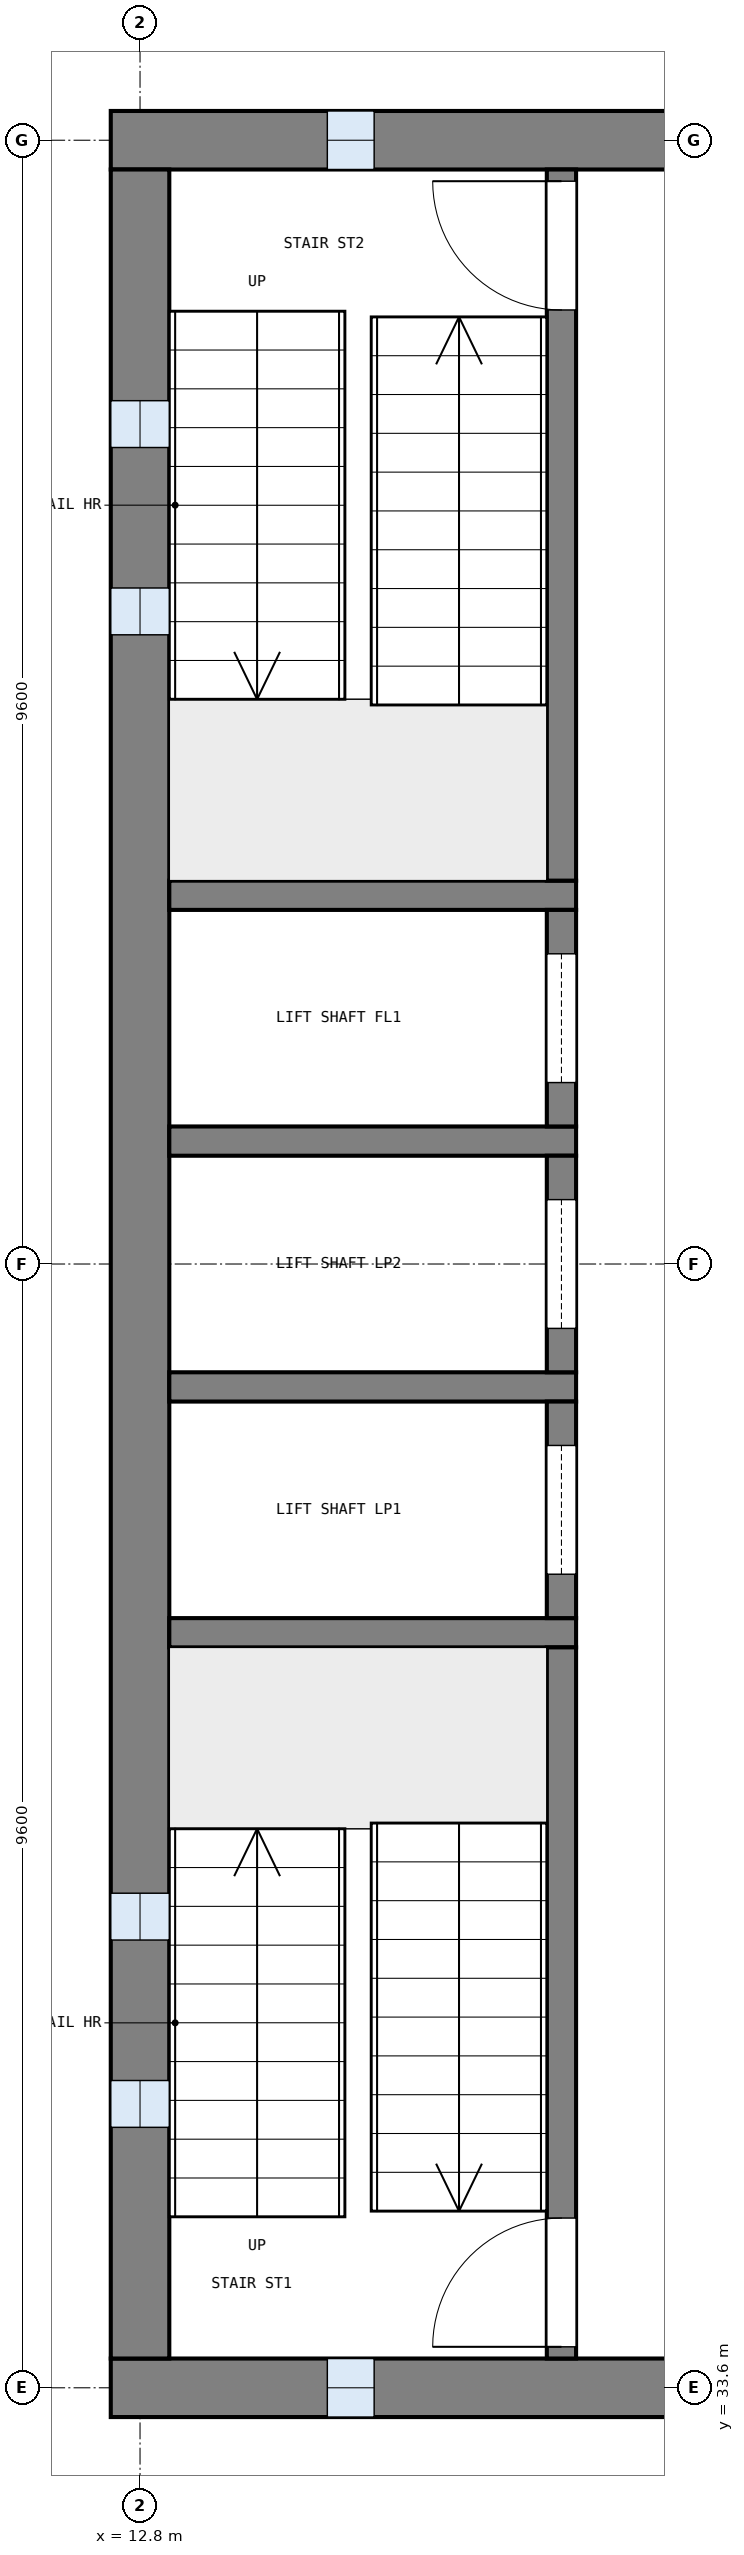
"""IFC4 building model, lengths in metres.
Left out: names, types, materials, properties, quantities, classifications, styles, units other than length and angle.
Written with IfcOpenShell. Run it as: python <this file> out.ifc"""

import sys

from ifc_helpers import new_model, si_unit, direction, frame, frame_2d, origin, place, context, subcontext, project, spatial, rectangle, extrude, element, fill, save


model = new_model("IFC4")
c1 = context("Model", 3, precision=1e-05, world=origin(), true_north=direction((0.0, 1.0)))
c2 = subcontext(c1, "Body", "Model", "MODEL_VIEW")
j1 = project(units=[si_unit("LENGTHUNIT", "METRE"), si_unit("PLANEANGLEUNIT", "RADIAN")], contexts=[c1])
p1 = place(None, origin())
s1 = spatial("IfcSite", under=j1, at=p1, CompositionType="ELEMENT")
p2 = place(p1, origin())
s2 = spatial("IfcBuilding", under=s1, at=p2, CompositionType="ELEMENT")
p3 = place(p2, frame((0.0, 0.0, 21.0)))
s3 = spatial("IfcBuildingStorey", under=s2, at=p3, CompositionType="ELEMENT", Elevation=21.0)
p4 = place(p3, frame((12.55, 52.8, 0.0), z_axis=(0.0, 0.0, 1.0), x_axis=(1.0, 0.0, 0.0)))
e1 = element("IfcWall", 1, at=p4, inside=s3, PredefinedType="SHEAR", context=c2, shape_type="SweptSolid", body=[
    extrude(rectangle(XDim=13.3, YDim=0.5, at=frame_2d((6.65, 0.0))), origin(), (0.0, 0.0, 1.0), 3.9),
])
p5 = place(p4, frame((1.85, 0.0, 1.0)))
e2 = element("IfcOpeningElement", 2, at=p5, cuts=e1, PredefinedType="OPENING", context=c2, shape_type="SweptSolid", body=[
    extrude(rectangle(XDim=0.4, YDim=2.0, at=frame_2d((0.2, 1.0))), frame((0.0, 0.26, 0.0), z_axis=(0.0, -1.0, 0.0), x_axis=(1.0, 0.0, 0.0)), (0.0, 0.0, 1.0), 0.52),
])
p6 = place(p3, frame((12.55, 33.6, 0.0), z_axis=(0.0, 0.0, 1.0), x_axis=(1.0, 0.0, 0.0)))
e3 = element("IfcWall", 3, at=p6, inside=s3, PredefinedType="SHEAR", context=c2, shape_type="SweptSolid", body=[
    extrude(rectangle(XDim=13.3, YDim=0.5, at=frame_2d((6.65, 0.0))), origin(), (0.0, 0.0, 1.0), 3.9),
])
p7 = place(p6, frame((1.85, 0.0, 1.0)))
e4 = element("IfcOpeningElement", 4, at=p7, cuts=e3, PredefinedType="OPENING", context=c2, shape_type="SweptSolid", body=[
    extrude(rectangle(XDim=0.4, YDim=2.0, at=frame_2d((0.2, 1.0))), frame((0.0, 0.26, 0.0), z_axis=(0.0, -1.0, 0.0), x_axis=(1.0, 0.0, 0.0)), (0.0, 0.0, 1.0), 0.52),
])
p8 = place(p3, frame((12.8, 33.85, 0.0), z_axis=(0.0, 0.0, 1.0), x_axis=(0.0, 1.0, 0.0)))
e5 = element("IfcWall", 5, at=p8, inside=s3, PredefinedType="SHEAR", context=c2, shape_type="SweptSolid", body=[
    extrude(rectangle(XDim=18.7, YDim=0.5, at=frame_2d((9.35, 0.0))), origin(), (0.0, 0.0, 1.0), 3.9),
])
p9 = place(p8, frame((1.975, 0.0, 1.0)))
e6 = element("IfcOpeningElement", 6, at=p9, cuts=e5, PredefinedType="OPENING", context=c2, shape_type="SweptSolid", body=[
    extrude(rectangle(XDim=0.4, YDim=2.0, at=frame_2d((0.2, 1.0))), frame((0.0, 0.26, 0.0), z_axis=(0.0, -1.0, 0.0), x_axis=(1.0, 0.0, 0.0)), (0.0, 0.0, 1.0), 0.52),
])
p10 = place(p8, frame((3.575, 0.0, 1.0)))
e7 = element("IfcOpeningElement", 7, at=p10, cuts=e5, PredefinedType="OPENING", context=c2, shape_type="SweptSolid", body=[
    extrude(rectangle(XDim=0.4, YDim=2.0, at=frame_2d((0.2, 1.0))), frame((0.0, 0.26, 0.0), z_axis=(0.0, -1.0, 0.0), x_axis=(1.0, 0.0, 0.0)), (0.0, 0.0, 1.0), 0.52),
])
p11 = place(p8, frame((14.725, 0.0, 1.0)))
e8 = element("IfcOpeningElement", 8, at=p11, cuts=e5, PredefinedType="OPENING", context=c2, shape_type="SweptSolid", body=[
    extrude(rectangle(XDim=0.4, YDim=2.0, at=frame_2d((0.2, 1.0))), frame((0.0, 0.26, 0.0), z_axis=(0.0, -1.0, 0.0), x_axis=(1.0, 0.0, 0.0)), (0.0, 0.0, 1.0), 0.52),
])
p12 = place(p8, frame((16.325, 0.0, 1.0)))
e9 = element("IfcOpeningElement", 9, at=p12, cuts=e5, PredefinedType="OPENING", context=c2, shape_type="SweptSolid", body=[
    extrude(rectangle(XDim=0.4, YDim=2.0, at=frame_2d((0.2, 1.0))), frame((0.0, 0.26, 0.0), z_axis=(0.0, -1.0, 0.0), x_axis=(1.0, 0.0, 0.0)), (0.0, 0.0, 1.0), 0.52),
])
for number, where, z_axis, x_axis in (
    (10, (13.05, 40.05, 0.0), (0.0, 0.0, 1.0), (1.0, 0.0, 0.0)),
    (11, (13.05, 42.15, 0.0), (0.0, 0.0, 1.0), (1.0, 0.0, 0.0)),
    (12, (13.05, 44.25, 0.0), (0.0, 0.0, 1.0), (1.0, 0.0, 0.0)),
    (13, (13.05, 46.35, 0.0), (0.0, 0.0, 1.0), (1.0, 0.0, 0.0)),
):
    element("IfcWall", number, at=place(p3, frame(where, z_axis=z_axis, x_axis=x_axis)), inside=s3, PredefinedType="SOLIDWALL", context=c2, shape_type="SweptSolid", body=[
        extrude(rectangle(XDim=3.475, YDim=0.25, at=frame_2d((1.737, 0.0))), origin(), (0.0, 0.0, 1.0), 3.6),
    ])
p13 = place(p3, frame((16.4, 33.85, 0.0), z_axis=(0.0, 0.0, 1.0), x_axis=(0.0, 1.0, 0.0)))
e14 = element("IfcWall", 14, at=p13, inside=s3, PredefinedType="SOLIDWALL", context=c2, shape_type="SweptSolid", body=[
    extrude(rectangle(XDim=6.075, YDim=0.25, at=frame_2d((3.038, 0.0))), origin(), (0.0, 0.0, 1.0), 3.6),
])
p14 = place(p13, frame((0.1, 0.0, 0.0)))
e15 = element("IfcOpeningElement", 15, at=p14, cuts=e14, PredefinedType="OPENING", context=c2, shape_type="SweptSolid", body=[
    extrude(rectangle(XDim=1.1, YDim=2.1, at=frame_2d((0.55, 1.05))), frame((0.0, 0.135, 0.0), z_axis=(0.0, -1.0, 0.0), x_axis=(1.0, 0.0, 0.0)), (0.0, 0.0, 1.0), 0.27),
])
p15 = place(p3, frame((16.4, 40.175, 0.0), z_axis=(0.0, 0.0, 1.0), x_axis=(0.0, 1.0, 0.0)))
e16 = element("IfcWall", 16, at=p15, inside=s3, PredefinedType="SOLIDWALL", context=c2, shape_type="SweptSolid", body=[
    extrude(rectangle(XDim=1.85, YDim=0.25, at=frame_2d((0.925, 0.0))), origin(), (0.0, 0.0, 1.0), 3.6),
])
p16 = place(p15, frame((0.375, 0.0, 0.0)))
e17 = element("IfcOpeningElement", 17, at=p16, cuts=e16, PredefinedType="OPENING", context=c2, shape_type="SweptSolid", body=[
    extrude(rectangle(XDim=1.1, YDim=2.1, at=frame_2d((0.55, 1.05))), frame((0.0, 0.135, 0.0), z_axis=(0.0, -1.0, 0.0), x_axis=(1.0, 0.0, 0.0)), (0.0, 0.0, 1.0), 0.27),
])
p17 = place(p3, frame((16.4, 42.275, 0.0), z_axis=(0.0, 0.0, 1.0), x_axis=(0.0, 1.0, 0.0)))
e18 = element("IfcWall", 18, at=p17, inside=s3, PredefinedType="SOLIDWALL", context=c2, shape_type="SweptSolid", body=[
    extrude(rectangle(XDim=1.85, YDim=0.25, at=frame_2d((0.925, 0.0))), origin(), (0.0, 0.0, 1.0), 3.6),
])
p18 = place(p17, frame((0.375, 0.0, 0.0)))
e19 = element("IfcOpeningElement", 19, at=p18, cuts=e18, PredefinedType="OPENING", context=c2, shape_type="SweptSolid", body=[
    extrude(rectangle(XDim=1.1, YDim=2.1, at=frame_2d((0.55, 1.05))), frame((0.0, 0.135, 0.0), z_axis=(0.0, -1.0, 0.0), x_axis=(1.0, 0.0, 0.0)), (0.0, 0.0, 1.0), 0.27),
])
p19 = place(p3, frame((16.4, 44.375, 0.0), z_axis=(0.0, 0.0, 1.0), x_axis=(0.0, 1.0, 0.0)))
e20 = element("IfcWall", 20, at=p19, inside=s3, PredefinedType="SOLIDWALL", context=c2, shape_type="SweptSolid", body=[
    extrude(rectangle(XDim=1.85, YDim=0.25, at=frame_2d((0.925, 0.0))), origin(), (0.0, 0.0, 1.0), 3.6),
])
p20 = place(p19, frame((0.375, 0.0, 0.0)))
e21 = element("IfcOpeningElement", 21, at=p20, cuts=e20, PredefinedType="OPENING", context=c2, shape_type="SweptSolid", body=[
    extrude(rectangle(XDim=1.1, YDim=2.1, at=frame_2d((0.55, 1.05))), frame((0.0, 0.135, 0.0), z_axis=(0.0, -1.0, 0.0), x_axis=(1.0, 0.0, 0.0)), (0.0, 0.0, 1.0), 0.27),
])
p21 = place(p3, frame((16.4, 46.475, 0.0), z_axis=(0.0, 0.0, 1.0), x_axis=(0.0, 1.0, 0.0)))
e22 = element("IfcWall", 22, at=p21, inside=s3, PredefinedType="SOLIDWALL", context=c2, shape_type="SweptSolid", body=[
    extrude(rectangle(XDim=6.075, YDim=0.25, at=frame_2d((3.038, 0.0))), origin(), (0.0, 0.0, 1.0), 3.6),
])
p22 = place(p21, frame((4.875, 0.0, 0.0)))
e23 = element("IfcOpeningElement", 23, at=p22, cuts=e22, PredefinedType="OPENING", context=c2, shape_type="SweptSolid", body=[
    extrude(rectangle(XDim=1.1, YDim=2.1, at=frame_2d((0.55, 1.05))), frame((0.0, 0.135, 0.0), z_axis=(0.0, -1.0, 0.0), x_axis=(1.0, 0.0, 0.0)), (0.0, 0.0, 1.0), 0.27),
])
p23 = place(p9, origin())
e24 = element("IfcWindow", 24, at=p23, inside=s3, PartitioningType="SINGLE_PANEL", PredefinedType="WINDOW", context=c2, shape_type="SweptSolid", body=[
    extrude(rectangle(XDim=0.4, YDim=2.0, at=frame_2d((0.2, 1.0))), frame((0.0, 0.03, 0.0), z_axis=(0.0, -1.0, 0.0), x_axis=(1.0, 0.0, 0.0)), (0.0, 0.0, 1.0), 0.06),
])
fill(e6, e24)
p24 = place(p10, origin())
e25 = element("IfcWindow", 25, at=p24, inside=s3, PartitioningType="SINGLE_PANEL", PredefinedType="WINDOW", context=c2, shape_type="SweptSolid", body=[
    extrude(rectangle(XDim=0.4, YDim=2.0, at=frame_2d((0.2, 1.0))), frame((0.0, 0.03, 0.0), z_axis=(0.0, -1.0, 0.0), x_axis=(1.0, 0.0, 0.0)), (0.0, 0.0, 1.0), 0.06),
])
fill(e7, e25)
p25 = place(p11, origin())
e26 = element("IfcWindow", 26, at=p25, inside=s3, PartitioningType="SINGLE_PANEL", PredefinedType="WINDOW", context=c2, shape_type="SweptSolid", body=[
    extrude(rectangle(XDim=0.4, YDim=2.0, at=frame_2d((0.2, 1.0))), frame((0.0, 0.03, 0.0), z_axis=(0.0, -1.0, 0.0), x_axis=(1.0, 0.0, 0.0)), (0.0, 0.0, 1.0), 0.06),
])
fill(e8, e26)
p26 = place(p12, origin())
e27 = element("IfcWindow", 27, at=p26, inside=s3, PartitioningType="SINGLE_PANEL", PredefinedType="WINDOW", context=c2, shape_type="SweptSolid", body=[
    extrude(rectangle(XDim=0.4, YDim=2.0, at=frame_2d((0.2, 1.0))), frame((0.0, 0.03, 0.0), z_axis=(0.0, -1.0, 0.0), x_axis=(1.0, 0.0, 0.0)), (0.0, 0.0, 1.0), 0.06),
])
fill(e9, e27)
p27 = place(p7, origin())
e28 = element("IfcWindow", 28, at=p27, inside=s3, PartitioningType="SINGLE_PANEL", PredefinedType="WINDOW", context=c2, shape_type="SweptSolid", body=[
    extrude(rectangle(XDim=0.4, YDim=2.0, at=frame_2d((0.2, 1.0))), frame((0.0, 0.03, 0.0), z_axis=(0.0, -1.0, 0.0), x_axis=(1.0, 0.0, 0.0)), (0.0, 0.0, 1.0), 0.06),
])
fill(e4, e28)
p28 = place(p5, origin())
e29 = element("IfcWindow", 29, at=p28, inside=s3, PartitioningType="SINGLE_PANEL", PredefinedType="WINDOW", context=c2, shape_type="SweptSolid", body=[
    extrude(rectangle(XDim=0.4, YDim=2.0, at=frame_2d((0.2, 1.0))), frame((0.0, 0.03, 0.0), z_axis=(0.0, -1.0, 0.0), x_axis=(1.0, 0.0, 0.0)), (0.0, 0.0, 1.0), 0.06),
])
fill(e2, e29)
p29 = place(p14, origin())
e30 = element("IfcDoor", 30, at=p29, inside=s3, OperationType="SINGLE_SWING_LEFT", PredefinedType="DOOR", context=c2, shape_type="SweptSolid", body=[
    extrude(rectangle(XDim=1.1, YDim=2.1, at=frame_2d((0.55, 1.05))), frame((0.0, 0.025, 0.0), z_axis=(0.0, -1.0, 0.0), x_axis=(1.0, 0.0, 0.0)), (0.0, 0.0, 1.0), 0.05),
])
fill(e15, e30)
p30 = place(p22, origin())
e31 = element("IfcDoor", 31, at=p30, inside=s3, OperationType="SINGLE_SWING_RIGHT", PredefinedType="DOOR", context=c2, shape_type="SweptSolid", body=[
    extrude(rectangle(XDim=1.1, YDim=2.1, at=frame_2d((0.55, 1.05))), frame((0.0, 0.025, 0.0), z_axis=(0.0, -1.0, 0.0), x_axis=(1.0, 0.0, 0.0)), (0.0, 0.0, 1.0), 0.05),
])
fill(e23, e31)
p31 = place(p16, origin())
e32 = element("IfcDoor", 32, at=p31, inside=s3, OperationType="SLIDING_TO_LEFT", PredefinedType="DOOR", context=c2, shape_type="SweptSolid", body=[
    extrude(rectangle(XDim=1.1, YDim=2.1, at=frame_2d((0.55, 1.05))), frame((0.0, 0.025, 0.0), z_axis=(0.0, -1.0, 0.0), x_axis=(1.0, 0.0, 0.0)), (0.0, 0.0, 1.0), 0.05),
])
fill(e17, e32)
p32 = place(p18, origin())
e33 = element("IfcDoor", 33, at=p32, inside=s3, OperationType="SLIDING_TO_LEFT", PredefinedType="DOOR", context=c2, shape_type="SweptSolid", body=[
    extrude(rectangle(XDim=1.1, YDim=2.1, at=frame_2d((0.55, 1.05))), frame((0.0, 0.025, 0.0), z_axis=(0.0, -1.0, 0.0), x_axis=(1.0, 0.0, 0.0)), (0.0, 0.0, 1.0), 0.05),
])
fill(e19, e33)
p33 = place(p20, origin())
e34 = element("IfcDoor", 34, at=p33, inside=s3, OperationType="SLIDING_TO_LEFT", PredefinedType="DOOR", context=c2, shape_type="SweptSolid", body=[
    extrude(rectangle(XDim=1.1, YDim=2.1, at=frame_2d((0.55, 1.05))), frame((0.0, 0.025, 0.0), z_axis=(0.0, -1.0, 0.0), x_axis=(1.0, 0.0, 0.0)), (0.0, 0.0, 1.0), 0.05),
])
fill(e21, e34)
save(model, sys.argv[1])
